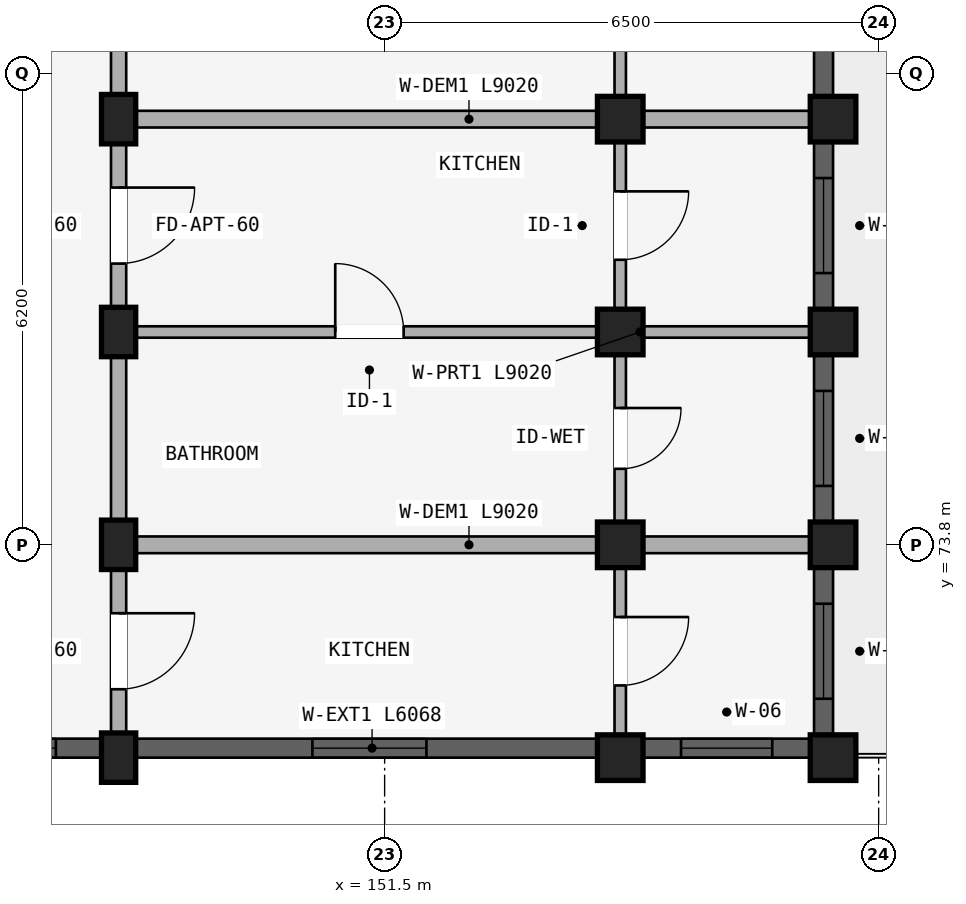
"""IFC4 building model, lengths in metres.
Left out: names, types, materials, properties, quantities, classifications, styles, units other than length and angle.
Written with IfcOpenShell. Run it as: python <this file> out.ifc"""

import sys

from ifc_helpers import new_model, si_unit, direction, frame, frame_2d, origin, origin_2d, place, context, subcontext, project, spatial, rectangle, extrude, element, fill, save


model = new_model("IFC4")
c1 = context("Model", 3, precision=1e-05, world=origin(), true_north=direction((0.0, 1.0)))
c2 = subcontext(c1, "Body", "Model", "MODEL_VIEW")
j1 = project(units=[si_unit("LENGTHUNIT", "METRE"), si_unit("PLANEANGLEUNIT", "RADIAN")], contexts=[c1])
p1 = place(None, origin())
s1 = spatial("IfcSite", under=j1, at=p1, CompositionType="ELEMENT")
p2 = place(p1, origin())
s2 = spatial("IfcBuilding", under=s1, at=p2, CompositionType="ELEMENT")
p3 = place(p2, frame((0.0, 0.0, 37.05)))
s3 = spatial("IfcBuildingStorey", under=s2, at=p3, CompositionType="ELEMENT", Elevation=37.05)
p4 = place(p3, frame((148.0, 79.4, 0.0), z_axis=(0.0, 0.0, 1.0), x_axis=(1.0, 0.0, 0.0)))
e1 = element("IfcColumn", 1, at=p4, inside=s3, PredefinedType="COLUMN", context=c2, shape_type="SweptSolid", body=[
    extrude(rectangle(XDim=0.45, YDim=0.65, at=origin_2d()), origin(), (0.0, 0.0, 1.0), 2.93),
])
p5 = place(p3, frame((154.6, 79.4, 0.0), z_axis=(0.0, 0.0, 1.0), x_axis=(1.0, 0.0, 0.0)))
e2 = element("IfcColumn", 2, at=p5, inside=s3, PredefinedType="COLUMN", context=c2, shape_type="SweptSolid", body=[
    extrude(rectangle(XDim=0.6, YDim=0.6, at=origin_2d()), origin(), (0.0, 0.0, 1.0), 2.93),
])
p6 = place(p3, frame((157.4, 79.4, 0.0), z_axis=(0.0, 0.0, 1.0), x_axis=(1.0, 0.0, 0.0)))
e3 = element("IfcColumn", 3, at=p6, inside=s3, PredefinedType="COLUMN", context=c2, shape_type="SweptSolid", body=[
    extrude(rectangle(XDim=0.6, YDim=0.6, at=origin_2d()), origin(), (0.0, 0.0, 1.0), 2.97),
])
p7 = place(p3, frame((148.0, 76.6, 0.0), z_axis=(0.0, 0.0, 1.0), x_axis=(1.0, 0.0, 0.0)))
e4 = element("IfcColumn", 4, at=p7, inside=s3, PredefinedType="COLUMN", context=c2, shape_type="SweptSolid", body=[
    extrude(rectangle(XDim=0.45, YDim=0.65, at=origin_2d()), origin(), (0.0, 0.0, 1.0), 2.93),
])
p8 = place(p3, frame((154.6, 76.6, 0.0), z_axis=(0.0, 0.0, 1.0), x_axis=(1.0, 0.0, 0.0)))
e5 = element("IfcColumn", 5, at=p8, inside=s3, PredefinedType="COLUMN", context=c2, shape_type="SweptSolid", body=[
    extrude(rectangle(XDim=0.6, YDim=0.6, at=origin_2d()), origin(), (0.0, 0.0, 1.0), 2.93),
])
p9 = place(p3, frame((157.4, 76.6, 0.0), z_axis=(0.0, 0.0, 1.0), x_axis=(1.0, 0.0, 0.0)))
e6 = element("IfcColumn", 6, at=p9, inside=s3, PredefinedType="COLUMN", context=c2, shape_type="SweptSolid", body=[
    extrude(rectangle(XDim=0.6, YDim=0.6, at=origin_2d()), origin(), (0.0, 0.0, 1.0), 2.97),
])
p10 = place(p3, frame((148.0, 73.8, 0.0), z_axis=(0.0, 0.0, 1.0), x_axis=(1.0, 0.0, 0.0)))
e7 = element("IfcColumn", 7, at=p10, inside=s3, PredefinedType="COLUMN", context=c2, shape_type="SweptSolid", body=[
    extrude(rectangle(XDim=0.45, YDim=0.65, at=origin_2d()), origin(), (0.0, 0.0, 1.0), 2.93),
])
p11 = place(p3, frame((154.6, 73.8, 0.0), z_axis=(0.0, 0.0, 1.0), x_axis=(1.0, 0.0, 0.0)))
e8 = element("IfcColumn", 8, at=p11, inside=s3, PredefinedType="COLUMN", context=c2, shape_type="SweptSolid", body=[
    extrude(rectangle(XDim=0.6, YDim=0.6, at=origin_2d()), origin(), (0.0, 0.0, 1.0), 2.93),
])
p12 = place(p3, frame((157.4, 73.8, 0.0), z_axis=(0.0, 0.0, 1.0), x_axis=(1.0, 0.0, 0.0)))
e9 = element("IfcColumn", 9, at=p12, inside=s3, PredefinedType="COLUMN", context=c2, shape_type="SweptSolid", body=[
    extrude(rectangle(XDim=0.6, YDim=0.6, at=origin_2d()), origin(), (0.0, 0.0, 1.0), 2.97),
])
p13 = place(p3, frame((148.0, 71.0, 0.0), z_axis=(0.0, 0.0, 1.0), x_axis=(1.0, 0.0, 0.0)))
e10 = element("IfcColumn", 10, at=p13, inside=s3, PredefinedType="COLUMN", context=c2, shape_type="SweptSolid", body=[
    extrude(rectangle(XDim=0.45, YDim=0.65, at=origin_2d()), origin(), (0.0, 0.0, 1.0), 2.93),
])
p14 = place(p3, frame((154.6, 71.0, 0.0), z_axis=(0.0, 0.0, 1.0), x_axis=(1.0, 0.0, 0.0)))
e11 = element("IfcColumn", 11, at=p14, inside=s3, PredefinedType="COLUMN", context=c2, shape_type="SweptSolid", body=[
    extrude(rectangle(XDim=0.6, YDim=0.6, at=origin_2d()), origin(), (0.0, 0.0, 1.0), 2.93),
])
p15 = place(p3, frame((157.4, 71.0, 0.0), z_axis=(0.0, 0.0, 1.0), x_axis=(1.0, 0.0, 0.0)))
e12 = element("IfcColumn", 12, at=p15, inside=s3, PredefinedType="COLUMN", context=c2, shape_type="SweptSolid", body=[
    extrude(rectangle(XDim=0.6, YDim=0.6, at=origin_2d()), origin(), (0.0, 0.0, 1.0), 2.97),
])
p16 = place(p3, frame((148.0, 83.6, 0.0), z_axis=(0.0, 0.0, 1.0), x_axis=(0.0, -1.0, 0.0)))
e13 = element("IfcWall", 13, at=p16, inside=s3, PredefinedType="STANDARD", context=c2, shape_type="SweptSolid", body=[
    extrude(rectangle(XDim=4.2, YDim=0.2, at=frame_2d((2.1, 0.0))), origin(), (0.0, 0.0, 1.0), 2.372),
])
p17 = place(p16, frame((1.6, 0.0, 0.0)))
e14 = element("IfcOpeningElement", 14, at=p17, cuts=e13, PredefinedType="OPENING", context=c2, shape_type="SweptSolid", body=[
    extrude(rectangle(XDim=1.0, YDim=2.15, at=frame_2d((0.5, 1.075))), frame((0.0, 0.11, 0.0), z_axis=(0.0, -1.0, 0.0), x_axis=(1.0, 0.0, 0.0)), (0.0, 0.0, 1.0), 0.22),
])
p18 = place(p3, frame((154.6, 83.52, 0.0), z_axis=(0.0, 0.0, 1.0), x_axis=(0.0, -1.0, 0.0)))
e15 = element("IfcWall", 15, at=p18, inside=s3, PredefinedType="PARTITIONING", context=c2, shape_type="SweptSolid", body=[
    extrude(rectangle(XDim=4.04, YDim=0.15, at=frame_2d((2.02, 0.0))), origin(), (0.0, 0.0, 1.0), 2.372),
])
p19 = place(p18, frame((1.57, 0.0, 0.0)))
e16 = element("IfcOpeningElement", 16, at=p19, cuts=e15, PredefinedType="OPENING", context=c2, shape_type="SweptSolid", body=[
    extrude(rectangle(XDim=0.9, YDim=2.1, at=frame_2d((0.45, 1.05))), frame((0.0, 0.085, 0.0), z_axis=(0.0, -1.0, 0.0), x_axis=(1.0, 0.0, 0.0)), (0.0, 0.0, 1.0), 0.17),
])
p20 = place(p3, frame((148.0, 79.4, 0.0), z_axis=(0.0, 0.0, 1.0), x_axis=(0.0, -1.0, 0.0)))
e17 = element("IfcWall", 17, at=p20, inside=s3, PredefinedType="STANDARD", context=c2, shape_type="SweptSolid", body=[
    extrude(rectangle(XDim=2.8, YDim=0.2, at=frame_2d((1.4, 0.0))), origin(), (0.0, 0.0, 1.0), 2.372),
])
p21 = place(p20, frame((0.9, 0.0, 0.0)))
e18 = element("IfcOpeningElement", 18, at=p21, cuts=e17, PredefinedType="OPENING", context=c2, shape_type="SweptSolid", body=[
    extrude(rectangle(XDim=1.0, YDim=2.15, at=frame_2d((0.5, 1.075))), frame((0.0, 0.11, 0.0), z_axis=(0.0, -1.0, 0.0), x_axis=(1.0, 0.0, 0.0)), (0.0, 0.0, 1.0), 0.22),
])
p22 = place(p3, frame((154.6, 79.32, 0.0), z_axis=(0.0, 0.0, 1.0), x_axis=(0.0, -1.0, 0.0)))
e19 = element("IfcWall", 19, at=p22, inside=s3, PredefinedType="PLUMBINGWALL", context=c2, shape_type="SweptSolid", body=[
    extrude(rectangle(XDim=2.64, YDim=0.15, at=frame_2d((1.32, 0.0))), origin(), (0.0, 0.0, 1.0), 2.372),
])
p23 = place(p22, frame((0.87, 0.0, 0.0)))
e20 = element("IfcOpeningElement", 20, at=p23, cuts=e19, PredefinedType="OPENING", context=c2, shape_type="SweptSolid", body=[
    extrude(rectangle(XDim=0.9, YDim=2.1, at=frame_2d((0.45, 1.05))), frame((0.0, 0.085, 0.0), z_axis=(0.0, -1.0, 0.0), x_axis=(1.0, 0.0, 0.0)), (0.0, 0.0, 1.0), 0.17),
])
p24 = place(p3, frame((148.1, 79.4, 0.0), z_axis=(0.0, 0.0, 1.0), x_axis=(1.0, 0.0, 0.0)))
e21 = element("IfcWall", 21, at=p24, inside=s3, PredefinedType="STANDARD", context=c2, shape_type="SweptSolid", body=[
    extrude(rectangle(XDim=9.02, YDim=0.22, at=frame_2d((4.51, 0.0))), origin(), (0.0, 0.0, 1.0), 2.372),
])
p25 = place(p3, frame((148.0, 76.6, 0.0), z_axis=(0.0, 0.0, 1.0), x_axis=(0.0, -1.0, 0.0)))
e22 = element("IfcWall", 22, at=p25, inside=s3, PredefinedType="STANDARD", context=c2, shape_type="SweptSolid", body=[
    extrude(rectangle(XDim=2.8, YDim=0.2, at=frame_2d((1.4, 0.0))), origin(), (0.0, 0.0, 1.0), 2.372),
])
p26 = place(p3, frame((154.6, 76.52, 0.0), z_axis=(0.0, 0.0, 1.0), x_axis=(0.0, -1.0, 0.0)))
e23 = element("IfcWall", 23, at=p26, inside=s3, PredefinedType="PLUMBINGWALL", context=c2, shape_type="SweptSolid", body=[
    extrude(rectangle(XDim=2.64, YDim=0.15, at=frame_2d((1.32, 0.0))), origin(), (0.0, 0.0, 1.0), 2.372),
])
p27 = place(p26, frame((0.92, 0.0, 0.0)))
e24 = element("IfcOpeningElement", 24, at=p27, cuts=e23, PredefinedType="OPENING", context=c2, shape_type="SweptSolid", body=[
    extrude(rectangle(XDim=0.8, YDim=2.1, at=frame_2d((0.4, 1.05))), frame((0.0, 0.085, 0.0), z_axis=(0.0, -1.0, 0.0), x_axis=(1.0, 0.0, 0.0)), (0.0, 0.0, 1.0), 0.17),
])
p28 = place(p3, frame((148.1, 76.6, 0.0), z_axis=(0.0, 0.0, 1.0), x_axis=(1.0, 0.0, 0.0)))
e25 = element("IfcWall", 25, at=p28, inside=s3, PredefinedType="PARTITIONING", context=c2, shape_type="SweptSolid", body=[
    extrude(rectangle(XDim=9.02, YDim=0.15, at=frame_2d((4.51, 0.0))), origin(), (0.0, 0.0, 1.0), 2.372),
])
p29 = place(p28, frame((2.75, 0.0, 0.0)))
e26 = element("IfcOpeningElement", 26, at=p29, cuts=e25, PredefinedType="OPENING", context=c2, shape_type="SweptSolid", body=[
    extrude(rectangle(XDim=0.9, YDim=2.1, at=frame_2d((0.45, 1.05))), frame((0.0, 0.085, 0.0), z_axis=(0.0, -1.0, 0.0), x_axis=(1.0, 0.0, 0.0)), (0.0, 0.0, 1.0), 0.17),
])
p30 = place(p3, frame((148.0, 73.8, 0.0), z_axis=(0.0, 0.0, 1.0), x_axis=(0.0, -1.0, 0.0)))
e27 = element("IfcWall", 27, at=p30, inside=s3, PredefinedType="STANDARD", context=c2, shape_type="SweptSolid", body=[
    extrude(rectangle(XDim=2.8, YDim=0.2, at=frame_2d((1.4, 0.0))), origin(), (0.0, 0.0, 1.0), 2.372),
])
p31 = place(p30, frame((0.9, 0.0, 0.0)))
e28 = element("IfcOpeningElement", 28, at=p31, cuts=e27, PredefinedType="OPENING", context=c2, shape_type="SweptSolid", body=[
    extrude(rectangle(XDim=1.0, YDim=2.15, at=frame_2d((0.5, 1.075))), frame((0.0, 0.11, 0.0), z_axis=(0.0, -1.0, 0.0), x_axis=(1.0, 0.0, 0.0)), (0.0, 0.0, 1.0), 0.22),
])
p32 = place(p3, frame((154.6, 73.72, 0.0), z_axis=(0.0, 0.0, 1.0), x_axis=(0.0, -1.0, 0.0)))
e29 = element("IfcWall", 29, at=p32, inside=s3, PredefinedType="PLUMBINGWALL", context=c2, shape_type="SweptSolid", body=[
    extrude(rectangle(XDim=2.64, YDim=0.15, at=frame_2d((1.32, 0.0))), origin(), (0.0, 0.0, 1.0), 2.372),
])
p33 = place(p32, frame((0.87, 0.0, 0.0)))
e30 = element("IfcOpeningElement", 30, at=p33, cuts=e29, PredefinedType="OPENING", context=c2, shape_type="SweptSolid", body=[
    extrude(rectangle(XDim=0.9, YDim=2.1, at=frame_2d((0.45, 1.05))), frame((0.0, 0.085, 0.0), z_axis=(0.0, -1.0, 0.0), x_axis=(1.0, 0.0, 0.0)), (0.0, 0.0, 1.0), 0.17),
])
p34 = place(p3, frame((148.1, 73.8, 0.0), z_axis=(0.0, 0.0, 1.0), x_axis=(1.0, 0.0, 0.0)))
e31 = element("IfcWall", 31, at=p34, inside=s3, PredefinedType="STANDARD", context=c2, shape_type="SweptSolid", body=[
    extrude(rectangle(XDim=9.02, YDim=0.22, at=frame_2d((4.51, 0.0))), origin(), (0.0, 0.0, 1.0), 2.372),
])
p35 = place(p3, frame((157.275, 83.296, 0.0), z_axis=(0.0, 0.0, 1.0), x_axis=(0.0, -1.0, 0.0)))
e32 = element("IfcWall", 32, at=p35, inside=s3, PredefinedType="STANDARD", context=c2, shape_type="SweptSolid", body=[
    extrude(rectangle(XDim=3.593, YDim=0.25, at=frame_2d((1.796, 0.0))), origin(), (0.0, 0.0, 1.0), 2.48),
])
p36 = place(p35, frame((1.171, 0.0, 0.73)))
e33 = element("IfcOpeningElement", 33, at=p36, cuts=e32, PredefinedType="OPENING", context=c2, shape_type="SweptSolid", body=[
    extrude(rectangle(XDim=1.25, YDim=1.55, at=frame_2d((0.625, 0.775))), frame((0.0, 0.135, 0.0), z_axis=(0.0, -1.0, 0.0), x_axis=(1.0, 0.0, 0.0)), (0.0, 0.0, 1.0), 0.27),
])
p37 = place(p3, frame((157.275, 79.096, 0.0), z_axis=(0.0, 0.0, 1.0), x_axis=(0.0, -1.0, 0.0)))
e34 = element("IfcWall", 34, at=p37, inside=s3, PredefinedType="STANDARD", context=c2, shape_type="SweptSolid", body=[
    extrude(rectangle(XDim=2.193, YDim=0.25, at=frame_2d((1.096, 0.0))), origin(), (0.0, 0.0, 1.0), 2.48),
])
p38 = place(p37, frame((0.471, 0.0, 0.73)))
e35 = element("IfcOpeningElement", 35, at=p38, cuts=e34, PredefinedType="OPENING", context=c2, shape_type="SweptSolid", body=[
    extrude(rectangle(XDim=1.25, YDim=1.55, at=frame_2d((0.625, 0.775))), frame((0.0, 0.135, 0.0), z_axis=(0.0, -1.0, 0.0), x_axis=(1.0, 0.0, 0.0)), (0.0, 0.0, 1.0), 0.27),
])
p39 = place(p3, frame((157.275, 76.296, 0.0), z_axis=(0.0, 0.0, 1.0), x_axis=(0.0, -1.0, 0.0)))
e36 = element("IfcWall", 36, at=p39, inside=s3, PredefinedType="STANDARD", context=c2, shape_type="SweptSolid", body=[
    extrude(rectangle(XDim=2.193, YDim=0.25, at=frame_2d((1.096, 0.0))), origin(), (0.0, 0.0, 1.0), 2.48),
])
p40 = place(p39, frame((0.471, 0.0, 0.73)))
e37 = element("IfcOpeningElement", 37, at=p40, cuts=e36, PredefinedType="OPENING", context=c2, shape_type="SweptSolid", body=[
    extrude(rectangle(XDim=1.25, YDim=1.55, at=frame_2d((0.625, 0.775))), frame((0.0, 0.135, 0.0), z_axis=(0.0, -1.0, 0.0), x_axis=(1.0, 0.0, 0.0)), (0.0, 0.0, 1.0), 0.27),
])
p41 = place(p3, frame((157.275, 73.497, 0.0), z_axis=(0.0, 0.0, 1.0), x_axis=(0.0, -1.0, 0.0)))
e38 = element("IfcWall", 38, at=p41, inside=s3, PredefinedType="STANDARD", context=c2, shape_type="SweptSolid", body=[
    extrude(rectangle(XDim=2.193, YDim=0.25, at=frame_2d((1.097, 0.0))), origin(), (0.0, 0.0, 1.0), 2.48),
])
p42 = place(p41, frame((0.471, 0.0, 0.73)))
e39 = element("IfcOpeningElement", 39, at=p42, cuts=e38, PredefinedType="OPENING", context=c2, shape_type="SweptSolid", body=[
    extrude(rectangle(XDim=1.25, YDim=1.55, at=frame_2d((0.625, 0.775))), frame((0.0, 0.135, 0.0), z_axis=(0.0, -1.0, 0.0), x_axis=(1.0, 0.0, 0.0)), (0.0, 0.0, 1.0), 0.27),
])
p43 = place(p3, frame((145.829, 71.125, 0.0), z_axis=(0.0, 0.0, 1.0), x_axis=(1.0, 0.0, 0.0)))
e40 = element("IfcWall", 40, at=p43, inside=s3, PredefinedType="STANDARD", context=c2, shape_type="SweptSolid", body=[
    extrude(rectangle(XDim=1.943, YDim=0.25, at=frame_2d((0.971, 0.0))), origin(), (0.0, 0.0, 1.0), 2.372),
])
p44 = place(p43, frame((0.596, 0.0, 0.88)))
e41 = element("IfcOpeningElement", 41, at=p44, cuts=e40, PredefinedType="OPENING", context=c2, shape_type="SweptSolid", body=[
    extrude(rectangle(XDim=0.75, YDim=1.05, at=frame_2d((0.375, 0.525))), frame((0.0, 0.135, 0.0), z_axis=(0.0, -1.0, 0.0), x_axis=(1.0, 0.0, 0.0)), (0.0, 0.0, 1.0), 0.27),
])
p45 = place(p3, frame((148.229, 71.125, 0.0), z_axis=(0.0, 0.0, 1.0), x_axis=(1.0, 0.0, 0.0)))
e42 = element("IfcWall", 42, at=p45, inside=s3, PredefinedType="STANDARD", context=c2, shape_type="SweptSolid", body=[
    extrude(rectangle(XDim=6.068, YDim=0.25, at=frame_2d((3.034, 0.0))), origin(), (0.0, 0.0, 1.0), 2.372),
])
p46 = place(p45, frame((2.322, 0.0, 0.522)))
e43 = element("IfcOpeningElement", 43, at=p46, cuts=e42, PredefinedType="OPENING", context=c2, shape_type="SweptSolid", body=[
    extrude(rectangle(XDim=1.5, YDim=1.65, at=frame_2d((0.75, 0.825))), frame((0.0, 0.135, 0.0), z_axis=(0.0, -1.0, 0.0), x_axis=(1.0, 0.0, 0.0)), (0.0, 0.0, 1.0), 0.27),
])
p47 = place(p3, frame((154.904, 71.125, 0.0), z_axis=(0.0, 0.0, 1.0), x_axis=(1.0, 0.0, 0.0)))
e44 = element("IfcWall", 44, at=p47, inside=s3, PredefinedType="STANDARD", context=c2, shape_type="SweptSolid", body=[
    extrude(rectangle(XDim=2.193, YDim=0.25, at=frame_2d((1.096, 0.0))), origin(), (0.0, 0.0, 1.0), 2.412),
])
p48 = place(p47, frame((0.497, 0.0, 0.712)))
e45 = element("IfcOpeningElement", 45, at=p48, cuts=e44, PredefinedType="OPENING", context=c2, shape_type="SweptSolid", body=[
    extrude(rectangle(XDim=1.2, YDim=1.5, at=frame_2d((0.6, 0.75))), frame((0.0, 0.135, 0.0), z_axis=(0.0, -1.0, 0.0), x_axis=(1.0, 0.0, 0.0)), (0.0, 0.0, 1.0), 0.27),
])
p49 = place(p38, origin())
e46 = element("IfcWindow", 46, at=p49, inside=s3, PartitioningType="SINGLE_PANEL", PredefinedType="WINDOW", context=c2, shape_type="SweptSolid", body=[
    extrude(rectangle(XDim=1.25, YDim=1.55, at=frame_2d((0.625, 0.775))), frame((0.0, 0.03, 0.0), z_axis=(0.0, -1.0, 0.0), x_axis=(1.0, 0.0, 0.0)), (0.0, 0.0, 1.0), 0.06),
])
fill(e35, e46)
p50 = place(p40, origin())
e47 = element("IfcWindow", 47, at=p50, inside=s3, PartitioningType="SINGLE_PANEL", PredefinedType="WINDOW", context=c2, shape_type="SweptSolid", body=[
    extrude(rectangle(XDim=1.25, YDim=1.55, at=frame_2d((0.625, 0.775))), frame((0.0, 0.03, 0.0), z_axis=(0.0, -1.0, 0.0), x_axis=(1.0, 0.0, 0.0)), (0.0, 0.0, 1.0), 0.06),
])
fill(e37, e47)
p51 = place(p42, origin())
e48 = element("IfcWindow", 48, at=p51, inside=s3, PartitioningType="SINGLE_PANEL", PredefinedType="WINDOW", context=c2, shape_type="SweptSolid", body=[
    extrude(rectangle(XDim=1.25, YDim=1.55, at=frame_2d((0.625, 0.775))), frame((0.0, 0.03, 0.0), z_axis=(0.0, -1.0, 0.0), x_axis=(1.0, 0.0, 0.0)), (0.0, 0.0, 1.0), 0.06),
])
fill(e39, e48)
p52 = place(p44, origin())
e49 = element("IfcWindow", 49, at=p52, inside=s3, PartitioningType="SINGLE_PANEL", PredefinedType="WINDOW", context=c2, shape_type="SweptSolid", body=[
    extrude(rectangle(XDim=0.75, YDim=1.05, at=frame_2d((0.375, 0.525))), frame((0.0, 0.03, 0.0), z_axis=(0.0, -1.0, 0.0), x_axis=(1.0, 0.0, 0.0)), (0.0, 0.0, 1.0), 0.06),
])
fill(e41, e49)
p53 = place(p46, origin())
e50 = element("IfcWindow", 50, at=p53, inside=s3, PartitioningType="DOUBLE_PANEL_VERTICAL", PredefinedType="WINDOW", context=c2, shape_type="SweptSolid", body=[
    extrude(rectangle(XDim=1.5, YDim=1.65, at=frame_2d((0.75, 0.825))), frame((0.0, 0.03, 0.0), z_axis=(0.0, -1.0, 0.0), x_axis=(1.0, 0.0, 0.0)), (0.0, 0.0, 1.0), 0.06),
])
fill(e43, e50)
p54 = place(p48, origin())
e51 = element("IfcWindow", 51, at=p54, inside=s3, PartitioningType="SINGLE_PANEL", PredefinedType="WINDOW", context=c2, shape_type="SweptSolid", body=[
    extrude(rectangle(XDim=1.2, YDim=1.5, at=frame_2d((0.6, 0.75))), frame((0.0, 0.03, 0.0), z_axis=(0.0, -1.0, 0.0), x_axis=(1.0, 0.0, 0.0)), (0.0, 0.0, 1.0), 0.06),
])
fill(e45, e51)
p55 = place(p23, origin())
e52 = element("IfcDoor", 52, at=p55, inside=s3, OperationType="SINGLE_SWING_LEFT", PredefinedType="DOOR", context=c2, shape_type="SweptSolid", body=[
    extrude(rectangle(XDim=0.9, YDim=2.1, at=frame_2d((0.45, 1.05))), frame((0.0, 0.025, 0.0), z_axis=(0.0, -1.0, 0.0), x_axis=(1.0, 0.0, 0.0)), (0.0, 0.0, 1.0), 0.05),
])
fill(e20, e52)
p56 = place(p21, frame((1.0, 0.0, 0.0), z_axis=(0.0, 0.0, 1.0), x_axis=(-1.0, 0.0, 0.0)))
e53 = element("IfcDoor", 53, at=p56, inside=s3, OperationType="SINGLE_SWING_RIGHT", PredefinedType="DOOR", context=c2, shape_type="SweptSolid", body=[
    extrude(rectangle(XDim=1.0, YDim=2.15, at=frame_2d((0.5, 1.075))), frame((0.0, 0.025, 0.0), z_axis=(0.0, -1.0, 0.0), x_axis=(1.0, 0.0, 0.0)), (0.0, 0.0, 1.0), 0.05),
])
fill(e18, e53)
p57 = place(p27, origin())
e54 = element("IfcDoor", 54, at=p57, inside=s3, OperationType="SINGLE_SWING_LEFT", PredefinedType="DOOR", context=c2, shape_type="SweptSolid", body=[
    extrude(rectangle(XDim=0.8, YDim=2.1, at=frame_2d((0.4, 1.05))), frame((0.0, 0.025, 0.0), z_axis=(0.0, -1.0, 0.0), x_axis=(1.0, 0.0, 0.0)), (0.0, 0.0, 1.0), 0.05),
])
fill(e24, e54)
p58 = place(p29, origin())
e55 = element("IfcDoor", 55, at=p58, inside=s3, OperationType="SINGLE_SWING_LEFT", PredefinedType="DOOR", context=c2, shape_type="SweptSolid", body=[
    extrude(rectangle(XDim=0.9, YDim=2.1, at=frame_2d((0.45, 1.05))), frame((0.0, 0.025, 0.0), z_axis=(0.0, -1.0, 0.0), x_axis=(1.0, 0.0, 0.0)), (0.0, 0.0, 1.0), 0.05),
])
fill(e26, e55)
p59 = place(p33, origin())
e56 = element("IfcDoor", 56, at=p59, inside=s3, OperationType="SINGLE_SWING_LEFT", PredefinedType="DOOR", context=c2, shape_type="SweptSolid", body=[
    extrude(rectangle(XDim=0.9, YDim=2.1, at=frame_2d((0.45, 1.05))), frame((0.0, 0.025, 0.0), z_axis=(0.0, -1.0, 0.0), x_axis=(1.0, 0.0, 0.0)), (0.0, 0.0, 1.0), 0.05),
])
fill(e30, e56)
p60 = place(p31, frame((1.0, 0.0, 0.0), z_axis=(0.0, 0.0, 1.0), x_axis=(-1.0, 0.0, 0.0)))
e57 = element("IfcDoor", 57, at=p60, inside=s3, OperationType="SINGLE_SWING_RIGHT", PredefinedType="DOOR", context=c2, shape_type="SweptSolid", body=[
    extrude(rectangle(XDim=1.0, YDim=2.15, at=frame_2d((0.5, 1.075))), frame((0.0, 0.025, 0.0), z_axis=(0.0, -1.0, 0.0), x_axis=(1.0, 0.0, 0.0)), (0.0, 0.0, 1.0), 0.05),
])
fill(e28, e57)
save(model, sys.argv[1])
